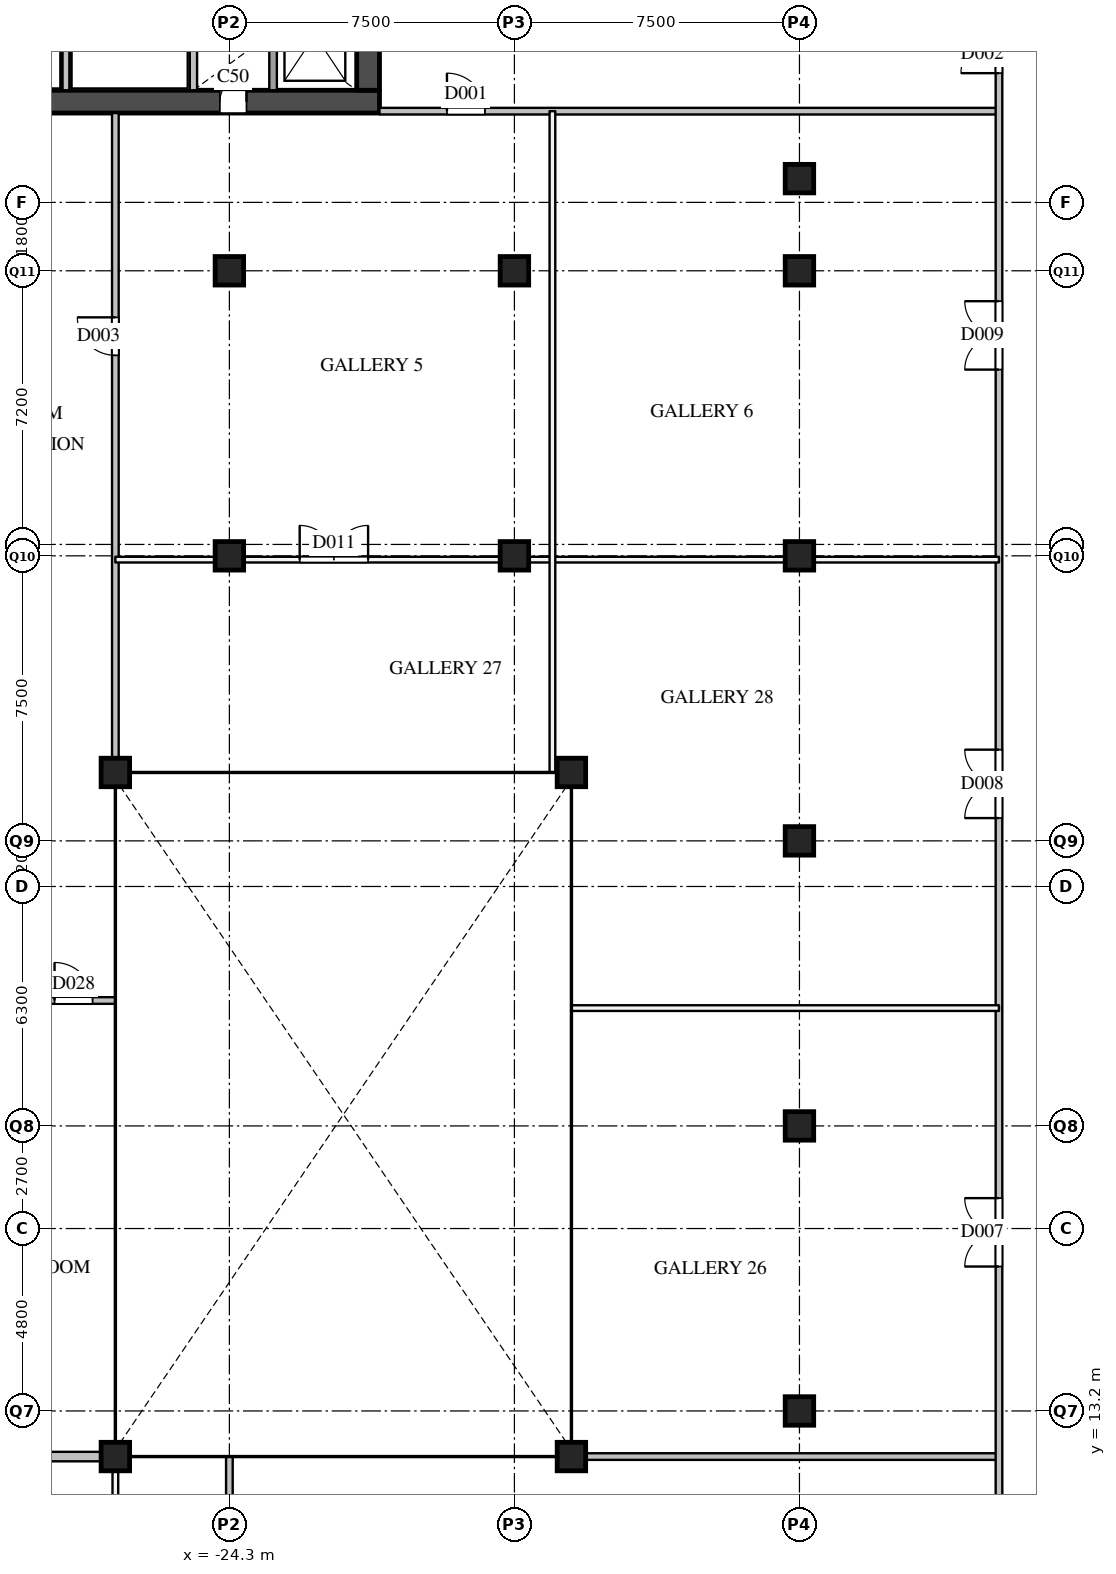
"""IFC4 building model, lengths in metres.
Left out: names, types, materials, properties, quantities, classifications, styles, units other than length and angle.
Written with IfcOpenShell. Run it as: python <this file> out.ifc"""

import sys

from ifc_helpers import new_model, si_unit, direction, frame, frame_2d, origin, origin_2d, place, context, subcontext, project, spatial, rectangle, extrude, element, fill, save


model = new_model("IFC4")
c1 = context("Model", 3, precision=1e-05, world=origin(), true_north=direction((0.0, 1.0)))
c2 = subcontext(c1, "Body", "Model", "MODEL_VIEW")
j1 = project(units=[si_unit("LENGTHUNIT", "METRE"), si_unit("PLANEANGLEUNIT", "RADIAN")], contexts=[c1])
p1 = place(None, origin())
s1 = spatial("IfcSite", under=j1, at=p1, CompositionType="ELEMENT")
p2 = place(p1, origin())
s2 = spatial("IfcBuilding", under=s1, at=p2, CompositionType="ELEMENT")
p3 = place(p2, frame((0.0, 0.0, 21.0)))
s3 = spatial("IfcBuildingStorey", under=s2, at=p3, CompositionType="ELEMENT", Elevation=21.0)
for number, where, z_axis, x_axis in (
    (1, (-24.3, 35.7, 0.0), (0.0, 0.0, 1.0), (1.0, 0.0, 0.0)),
    (2, (-24.3, 43.2, 0.0), (0.0, 0.0, 1.0), (1.0, 0.0, 0.0)),
    (3, (-16.8, 35.7, 0.0), (0.0, 0.0, 1.0), (1.0, 0.0, 0.0)),
    (4, (-16.8, 43.2, 0.0), (0.0, 0.0, 1.0), (1.0, 0.0, 0.0)),
    (5, (-9.3, 13.2, 0.0), (0.0, 0.0, 1.0), (1.0, 0.0, 0.0)),
    (6, (-9.3, 20.7, 0.0), (0.0, 0.0, 1.0), (1.0, 0.0, 0.0)),
    (7, (-9.3, 28.2, 0.0), (0.0, 0.0, 1.0), (1.0, 0.0, 0.0)),
    (8, (-9.3, 35.7, 0.0), (0.0, 0.0, 1.0), (1.0, 0.0, 0.0)),
    (9, (-9.3, 43.2, 0.0), (0.0, 0.0, 1.0), (1.0, 0.0, 0.0)),
    (10, (-27.3, 12.0, 0.0), (0.0, 0.0, 1.0), (1.0, 0.0, 0.0)),
    (11, (-15.3, 12.0, 0.0), (0.0, 0.0, 1.0), (1.0, 0.0, 0.0)),
    (12, (-15.3, 30.0, 0.0), (0.0, 0.0, 1.0), (1.0, 0.0, 0.0)),
    (13, (-27.3, 30.0, 0.0), (0.0, 0.0, 1.0), (1.0, 0.0, 0.0)),
    (14, (-9.3, 45.625, 0.0), (0.0, 0.0, 1.0), (1.0, 0.0, 0.0)),
):
    element("IfcColumn", number, at=place(p3, frame(where, z_axis=z_axis, x_axis=x_axis)), inside=s3, PredefinedType="COLUMN", context=c2, shape_type="SweptSolid", body=[
        extrude(rectangle(XDim=0.75, YDim=0.75, at=origin_2d()), origin(), (0.0, 0.0, 1.0), 5.0),
    ])
p4 = place(p3, frame((-32.55, 47.65, 0.0), z_axis=(0.0, 0.0, 1.0), x_axis=(1.0, 0.0, 0.0)))
e15 = element("IfcWall", 15, at=p4, inside=s3, PredefinedType="SHEAR", context=c2, shape_type="SweptSolid", body=[
    extrude(rectangle(XDim=12.2, YDim=0.6, at=frame_2d((6.1, 0.0))), origin(), (0.0, 0.0, 1.0), 4.55),
])
p5 = place(p4, frame((8.0, 0.0, 0.0)))
e16 = element("IfcOpeningElement", 16, at=p5, cuts=e15, PredefinedType="OPENING", context=c2, shape_type="SweptSolid", body=[
    extrude(rectangle(XDim=0.7, YDim=2.1, at=frame_2d((0.35, 1.05))), frame((0.0, 0.31, 0.0), z_axis=(0.0, -1.0, 0.0), x_axis=(1.0, 0.0, 0.0)), (0.0, 0.0, 1.0), 0.62),
])
p6 = place(p3, frame((-20.65, 47.95, 0.0), z_axis=(0.0, 0.0, 1.0), x_axis=(0.0, 1.0, 0.0)))
e17 = element("IfcWall", 17, at=p6, inside=s3, PredefinedType="SHEAR", context=c2, shape_type="SweptSolid", body=[
    extrude(rectangle(XDim=10.4, YDim=0.6, at=frame_2d((5.2, 0.0))), origin(), (0.0, 0.0, 1.0), 4.55),
])
p7 = place(p6, frame((6.7, 0.0, 0.0)))
e18 = element("IfcOpeningElement", 18, at=p7, cuts=e17, PredefinedType="OPENING", context=c2, shape_type="SweptSolid", body=[
    extrude(rectangle(XDim=1.0, YDim=2.1, at=frame_2d((0.5, 1.05))), frame((0.0, 0.31, 0.0), z_axis=(0.0, -1.0, 0.0), x_axis=(1.0, 0.0, 0.0)), (0.0, 0.0, 1.0), 0.62),
])
for number, where, z_axis, x_axis in (
    (19, (-28.6, 47.95, 0.0), (0.0, 0.0, 1.0), (0.0, 1.0, 0.0)),
    (20, (-25.25, 47.95, 0.0), (0.0, 0.0, 1.0), (0.0, 1.0, 0.0)),
):
    element("IfcWall", number, at=place(p3, frame(where, z_axis=z_axis, x_axis=x_axis)), inside=s3, PredefinedType="SOLIDWALL", context=c2, shape_type="SweptSolid", body=[
        extrude(rectangle(XDim=2.08, YDim=0.2, at=frame_2d((1.04, 0.0))), origin(), (0.0, 0.0, 1.0), 4.55),
    ])
p8 = place(p3, frame((-23.15, 47.95, 0.0), z_axis=(0.0, 0.0, 1.0), x_axis=(0.0, 1.0, 0.0)))
e21 = element("IfcWall", 21, at=p8, inside=s3, PredefinedType="SOLIDWALL", context=c2, shape_type="SweptSolid", body=[
    extrude(rectangle(XDim=2.9, YDim=0.2, at=frame_2d((1.45, 0.0))), origin(), (0.0, 0.0, 1.0), 4.55),
])
p9 = place(p3, frame((-15.3, 12.0, 0.0), z_axis=(0.0, 0.0, 1.0), x_axis=(1.0, 0.0, 0.0)))
e22 = element("IfcWall", 22, at=p9, inside=s3, PredefinedType="PARTITIONING", context=c2, shape_type="SweptSolid", body=[
    extrude(rectangle(XDim=11.25, YDim=0.175, at=frame_2d((5.625, 0.0))), origin(), (0.0, 0.0, 1.0), 3.79),
])
p10 = place(p3, frame((-29.5, 24.0, 0.0), z_axis=(0.0, 0.0, 1.0), x_axis=(1.0, 0.0, 0.0)))
e23 = element("IfcWall", 23, at=p10, inside=s3, PredefinedType="PARTITIONING", context=c2, shape_type="SweptSolid", body=[
    extrude(rectangle(XDim=2.2, YDim=0.175, at=frame_2d((1.1, 0.0))), origin(), (0.0, 0.0, 1.0), 4.55),
])
p11 = place(p10, frame((0.6, 0.0, 0.0)))
e24 = element("IfcOpeningElement", 24, at=p11, cuts=e23, PredefinedType="OPENING", context=c2, shape_type="SweptSolid", body=[
    extrude(rectangle(XDim=1.0, YDim=2.1, at=frame_2d((0.5, 1.05))), frame((0.0, 0.097, 0.0), z_axis=(0.0, -1.0, 0.0), x_axis=(1.0, 0.0, 0.0)), (0.0, 0.0, 1.0), 0.195),
])
p12 = place(p3, frame((-20.35, 47.4, 0.0), z_axis=(0.0, 0.0, 1.0), x_axis=(1.0, 0.0, 0.0)))
e25 = element("IfcWall", 25, at=p12, inside=s3, PredefinedType="PARTITIONING", context=c2, shape_type="SweptSolid", body=[
    extrude(rectangle(XDim=16.3, YDim=0.175, at=frame_2d((8.15, 0.0))), origin(), (0.0, 0.0, 1.0), 3.79),
])
p13 = place(p12, frame((1.775, 0.0, 0.0)))
e26 = element("IfcOpeningElement", 26, at=p13, cuts=e25, PredefinedType="OPENING", context=c2, shape_type="SweptSolid", body=[
    extrude(rectangle(XDim=1.0, YDim=2.1, at=frame_2d((0.5, 1.05))), frame((0.0, 0.097, 0.0), z_axis=(0.0, -1.0, 0.0), x_axis=(1.0, 0.0, 0.0)), (0.0, 0.0, 1.0), 0.195),
])
p14 = place(p3, frame((-27.3, 30.0, 0.0), z_axis=(0.0, 0.0, 1.0), x_axis=(0.0, 1.0, 0.0)))
e27 = element("IfcWall", 27, at=p14, inside=s3, PredefinedType="PARTITIONING", context=c2, shape_type="SweptSolid", body=[
    extrude(rectangle(XDim=17.35, YDim=0.175, at=frame_2d((8.675, 0.0))), origin(), (0.0, 0.0, 1.0), 3.79),
])
p15 = place(p14, frame((10.975, 0.0, 0.0)))
e28 = element("IfcOpeningElement", 28, at=p15, cuts=e27, PredefinedType="OPENING", context=c2, shape_type="SweptSolid", body=[
    extrude(rectangle(XDim=1.0, YDim=2.1, at=frame_2d((0.5, 1.05))), frame((0.0, 0.097, 0.0), z_axis=(0.0, -1.0, 0.0), x_axis=(1.0, 0.0, 0.0)), (0.0, 0.0, 1.0), 0.195),
])
p16 = place(p3, frame((-24.3, -9.3, 0.0), z_axis=(0.0, 0.0, 1.0), x_axis=(0.0, 1.0, 0.0)))
e29 = element("IfcWall", 29, at=p16, inside=s3, PredefinedType="PARTITIONING", context=c2, shape_type="SweptSolid", body=[
    extrude(rectangle(XDim=21.3, YDim=0.175, at=frame_2d((10.65, 0.0))), origin(), (0.0, 0.0, 1.0), 3.79),
])
p17 = place(p16, frame((2.5, 0.0, 0.0)))
e30 = element("IfcOpeningElement", 30, at=p17, cuts=e29, PredefinedType="OPENING", context=c2, shape_type="SweptSolid", body=[
    extrude(rectangle(XDim=1.0, YDim=2.1, at=frame_2d((0.5, 1.05))), frame((0.0, 0.097, 0.0), z_axis=(0.0, -1.0, 0.0), x_axis=(1.0, 0.0, 0.0)), (0.0, 0.0, 1.0), 0.195),
])
p18 = place(p16, frame((16.3, 0.0, 0.0)))
e31 = element("IfcOpeningElement", 31, at=p18, cuts=e29, PredefinedType="OPENING", context=c2, shape_type="SweptSolid", body=[
    extrude(rectangle(XDim=1.0, YDim=2.1, at=frame_2d((0.5, 1.05))), frame((0.0, 0.097, 0.0), z_axis=(0.0, -1.0, 0.0), x_axis=(1.0, 0.0, 0.0)), (0.0, 0.0, 1.0), 0.195),
])
p19 = place(p3, frame((-4.05, -4.05, 0.0), z_axis=(0.0, 0.0, 1.0), x_axis=(0.0, 1.0, 0.0)))
e32 = element("IfcWall", 32, at=p19, inside=s3, PredefinedType="PARTITIONING", context=c2, shape_type="SweptSolid", body=[
    extrude(rectangle(XDim=63.0, YDim=0.175, at=frame_2d((31.5, 0.0))), origin(), (0.0, 0.0, 1.0), 3.79),
])
p20 = place(p19, frame((52.45, 0.0, 0.0)))
e33 = element("IfcOpeningElement", 33, at=p20, cuts=e32, PredefinedType="OPENING", context=c2, shape_type="SweptSolid", body=[
    extrude(rectangle(XDim=1.0, YDim=2.1, at=frame_2d((0.5, 1.05))), frame((0.0, 0.097, 0.0), z_axis=(0.0, -1.0, 0.0), x_axis=(1.0, 0.0, 0.0)), (0.0, 0.0, 1.0), 0.195),
])
p21 = place(p19, frame((7.525, 0.0, 0.0)))
e34 = element("IfcOpeningElement", 34, at=p21, cuts=e32, PredefinedType="OPENING", context=c2, shape_type="SweptSolid", body=[
    extrude(rectangle(XDim=1.0, YDim=2.1, at=frame_2d((0.5, 1.05))), frame((0.0, 0.097, 0.0), z_axis=(0.0, -1.0, 0.0), x_axis=(1.0, 0.0, 0.0)), (0.0, 0.0, 1.0), 0.195),
])
p22 = place(p19, frame((21.05, 0.0, 0.0)))
e35 = element("IfcOpeningElement", 35, at=p22, cuts=e32, PredefinedType="OPENING", context=c2, shape_type="SweptSolid", body=[
    extrude(rectangle(XDim=1.8, YDim=2.1, at=frame_2d((0.9, 1.05))), frame((0.0, 0.097, 0.0), z_axis=(0.0, -1.0, 0.0), x_axis=(1.0, 0.0, 0.0)), (0.0, 0.0, 1.0), 0.195),
])
p23 = place(p19, frame((32.85, 0.0, 0.0)))
e36 = element("IfcOpeningElement", 36, at=p23, cuts=e32, PredefinedType="OPENING", context=c2, shape_type="SweptSolid", body=[
    extrude(rectangle(XDim=1.8, YDim=2.1, at=frame_2d((0.9, 1.05))), frame((0.0, 0.097, 0.0), z_axis=(0.0, -1.0, 0.0), x_axis=(1.0, 0.0, 0.0)), (0.0, 0.0, 1.0), 0.195),
])
p24 = place(p19, frame((44.65, 0.0, 0.0)))
e37 = element("IfcOpeningElement", 37, at=p24, cuts=e32, PredefinedType="OPENING", context=c2, shape_type="SweptSolid", body=[
    extrude(rectangle(XDim=1.8, YDim=2.1, at=frame_2d((0.9, 1.05))), frame((0.0, 0.097, 0.0), z_axis=(0.0, -1.0, 0.0), x_axis=(1.0, 0.0, 0.0)), (0.0, 0.0, 1.0), 0.195),
])
p25 = place(p3, frame((-15.3, 23.8, 0.0), z_axis=(0.0, 0.0, 1.0), x_axis=(1.0, 0.0, 0.0)))
e38 = element("IfcWall", 38, at=p25, inside=s3, PredefinedType="PARTITIONING", context=c2, shape_type="SweptSolid", body=[
    extrude(rectangle(XDim=11.25, YDim=0.15, at=frame_2d((5.625, 0.0))), origin(), (0.0, 0.0, 1.0), 3.79),
])
p26 = place(p3, frame((-27.3, 35.6, 0.0), z_axis=(0.0, 0.0, 1.0), x_axis=(1.0, 0.0, 0.0)))
e39 = element("IfcWall", 39, at=p26, inside=s3, PredefinedType="PARTITIONING", context=c2, shape_type="SweptSolid", body=[
    extrude(rectangle(XDim=23.25, YDim=0.15, at=frame_2d((11.625, 0.0))), origin(), (0.0, 0.0, 1.0), 3.79),
])
p27 = place(p26, frame((4.85, 0.0, 0.0)))
e40 = element("IfcOpeningElement", 40, at=p27, cuts=e39, PredefinedType="OPENING", context=c2, shape_type="SweptSolid", body=[
    extrude(rectangle(XDim=1.8, YDim=2.1, at=frame_2d((0.9, 1.05))), frame((0.0, 0.085, 0.0), z_axis=(0.0, -1.0, 0.0), x_axis=(1.0, 0.0, 0.0)), (0.0, 0.0, 1.0), 0.17),
])
p28 = place(p3, frame((-27.3, 3.0, 0.0), z_axis=(0.0, 0.0, 1.0), x_axis=(0.0, 1.0, 0.0)))
e41 = element("IfcWall", 41, at=p28, inside=s3, PredefinedType="PARTITIONING", context=c2, shape_type="SweptSolid", body=[
    extrude(rectangle(XDim=9.0, YDim=0.15, at=frame_2d((4.5, 0.0))), origin(), (0.0, 0.0, 1.0), 3.79),
])
p29 = place(p3, frame((-15.8, 30.0, 0.0), z_axis=(0.0, 0.0, 1.0), x_axis=(0.0, 1.0, 0.0)))
e42 = element("IfcWall", 42, at=p29, inside=s3, PredefinedType="PARTITIONING", context=c2, shape_type="SweptSolid", body=[
    extrude(rectangle(XDim=17.4, YDim=0.15, at=frame_2d((8.7, 0.0))), origin(), (0.0, 0.0, 1.0), 3.79),
])
p30 = place(p3, frame((-32.55, 12.0, 0.0), z_axis=(0.0, 0.0, 1.0), x_axis=(1.0, 0.0, 0.0)))
e43 = element("IfcWall", 43, at=p30, inside=s3, PredefinedType="PARTITIONING", context=c2, shape_type="SweptSolid", body=[
    extrude(rectangle(XDim=5.25, YDim=0.25, at=frame_2d((2.625, 0.0))), origin(), (0.0, 0.0, 1.0), 3.79),
])
p31 = place(p5, origin())
e44 = element("IfcDoor", 44, at=p31, inside=s3, OperationType="SINGLE_SWING_RIGHT", PredefinedType="DOOR", context=c2, shape_type="SweptSolid", body=[
    extrude(rectangle(XDim=0.7, YDim=2.1, at=frame_2d((0.35, 1.05))), frame((0.0, 0.025, 0.0), z_axis=(0.0, -1.0, 0.0), x_axis=(1.0, 0.0, 0.0)), (0.0, 0.0, 1.0), 0.05),
])
fill(e16, e44)
p32 = place(p13, origin())
e45 = element("IfcDoor", 45, at=p32, inside=s3, OperationType="SINGLE_SWING_LEFT", PredefinedType="DOOR", context=c2, shape_type="SweptSolid", body=[
    extrude(rectangle(XDim=1.0, YDim=2.1, at=frame_2d((0.5, 1.05))), frame((0.0, 0.025, 0.0), z_axis=(0.0, -1.0, 0.0), x_axis=(1.0, 0.0, 0.0)), (0.0, 0.0, 1.0), 0.05),
])
fill(e26, e45)
p33 = place(p20, origin())
e46 = element("IfcDoor", 46, at=p33, inside=s3, OperationType="SINGLE_SWING_LEFT", PredefinedType="DOOR", context=c2, shape_type="SweptSolid", body=[
    extrude(rectangle(XDim=1.0, YDim=2.1, at=frame_2d((0.5, 1.05))), frame((0.0, 0.025, 0.0), z_axis=(0.0, -1.0, 0.0), x_axis=(1.0, 0.0, 0.0)), (0.0, 0.0, 1.0), 0.05),
])
fill(e33, e46)
p34 = place(p15, origin())
e47 = element("IfcDoor", 47, at=p34, inside=s3, OperationType="SINGLE_SWING_RIGHT", PredefinedType="DOOR", context=c2, shape_type="SweptSolid", body=[
    extrude(rectangle(XDim=1.0, YDim=2.1, at=frame_2d((0.5, 1.05))), frame((0.0, 0.025, 0.0), z_axis=(0.0, -1.0, 0.0), x_axis=(1.0, 0.0, 0.0)), (0.0, 0.0, 1.0), 0.05),
])
fill(e28, e47)
p35 = place(p22, origin())
e48 = element("IfcDoor", 48, at=p35, inside=s3, OperationType="DOUBLE_DOOR_SINGLE_SWING", PredefinedType="DOOR", context=c2, shape_type="SweptSolid", body=[
    extrude(rectangle(XDim=1.8, YDim=2.1, at=frame_2d((0.9, 1.05))), frame((0.0, 0.025, 0.0), z_axis=(0.0, -1.0, 0.0), x_axis=(1.0, 0.0, 0.0)), (0.0, 0.0, 1.0), 0.05),
])
fill(e35, e48)
p36 = place(p23, origin())
e49 = element("IfcDoor", 49, at=p36, inside=s3, OperationType="DOUBLE_DOOR_SINGLE_SWING", PredefinedType="DOOR", context=c2, shape_type="SweptSolid", body=[
    extrude(rectangle(XDim=1.8, YDim=2.1, at=frame_2d((0.9, 1.05))), frame((0.0, 0.025, 0.0), z_axis=(0.0, -1.0, 0.0), x_axis=(1.0, 0.0, 0.0)), (0.0, 0.0, 1.0), 0.05),
])
fill(e36, e49)
p37 = place(p24, origin())
e50 = element("IfcDoor", 50, at=p37, inside=s3, OperationType="DOUBLE_DOOR_SINGLE_SWING", PredefinedType="DOOR", context=c2, shape_type="SweptSolid", body=[
    extrude(rectangle(XDim=1.8, YDim=2.1, at=frame_2d((0.9, 1.05))), frame((0.0, 0.025, 0.0), z_axis=(0.0, -1.0, 0.0), x_axis=(1.0, 0.0, 0.0)), (0.0, 0.0, 1.0), 0.05),
])
fill(e37, e50)
p38 = place(p27, origin())
e51 = element("IfcDoor", 51, at=p38, inside=s3, OperationType="DOUBLE_DOOR_SINGLE_SWING", PredefinedType="DOOR", context=c2, shape_type="SweptSolid", body=[
    extrude(rectangle(XDim=1.8, YDim=2.1, at=frame_2d((0.9, 1.05))), frame((0.0, 0.025, 0.0), z_axis=(0.0, -1.0, 0.0), x_axis=(1.0, 0.0, 0.0)), (0.0, 0.0, 1.0), 0.05),
])
fill(e40, e51)
p39 = place(p11, origin())
e52 = element("IfcDoor", 52, at=p39, inside=s3, OperationType="SINGLE_SWING_LEFT", PredefinedType="DOOR", context=c2, shape_type="SweptSolid", body=[
    extrude(rectangle(XDim=1.0, YDim=2.1, at=frame_2d((0.5, 1.05))), frame((0.0, 0.025, 0.0), z_axis=(0.0, -1.0, 0.0), x_axis=(1.0, 0.0, 0.0)), (0.0, 0.0, 1.0), 0.05),
])
fill(e24, e52)
save(model, sys.argv[1])
